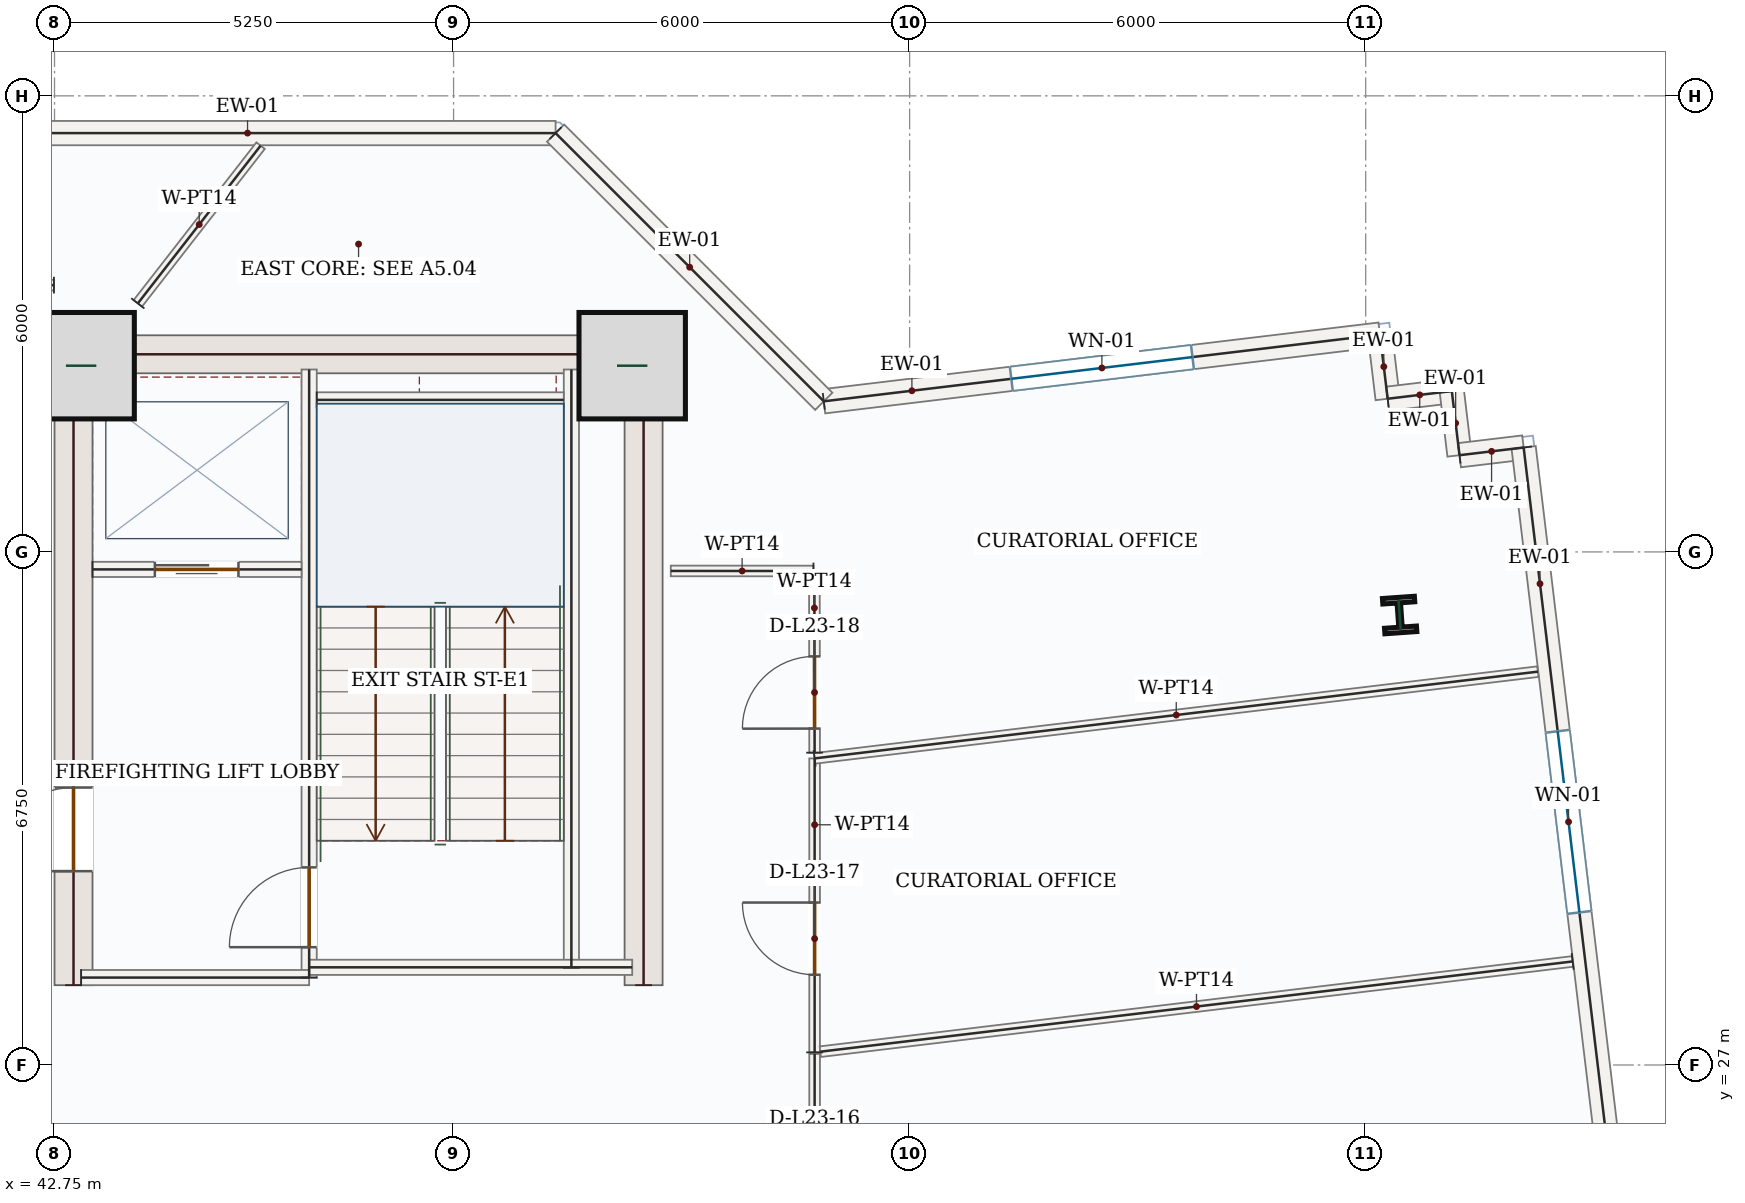
"""IFC4 building model, lengths in metres.
Left out: names, types, materials, properties, quantities, classifications, styles, units other than length and angle.
Written with IfcOpenShell. Run it as: python <this file> out.ifc"""

import sys

from ifc_helpers import new_model, si_unit, direction, frame, frame_2d, origin, origin_2d, place, context, subcontext, project, spatial, rectangle, i_section, extrude, source, transform, mapped, element, fill, save


model = new_model("IFC4")
c1 = context("Model", 3, precision=1e-05, world=origin(), true_north=direction((0.0, 1.0)))
c2 = subcontext(c1, "Body", "Model", "MODEL_VIEW")
j1 = project(units=[si_unit("LENGTHUNIT", "METRE"), si_unit("PLANEANGLEUNIT", "RADIAN")], contexts=[c1])
p1 = place(None, origin())
s1 = spatial("IfcSite", under=j1, at=p1, CompositionType="ELEMENT")
p2 = place(p1, origin())
s2 = spatial("IfcBuilding", under=s1, at=p2, CompositionType="ELEMENT")
p3 = place(p2, frame((0.0, 0.0, 104.7)))
s3 = spatial("IfcBuildingStorey", under=s2, at=p3, CompositionType="ELEMENT", Elevation=104.7)
p4 = place(p3, frame((43.0, 28.05, 0.0), z_axis=(0.0, 0.0, 1.0), x_axis=(0.0, 1.0, 0.0)))
e1 = element("IfcWall", 1, at=p4, inside=s3, PredefinedType="SHEAR", context=c2, shape_type="SweptSolid", body=[
    extrude(rectangle(XDim=8.55, YDim=0.5, at=frame_2d((4.275, 0.0))), origin(), (0.0, 0.0, 1.0), 3.95),
])
p5 = place(p4, frame((1.5, 0.0, 0.0)))
e2 = element("IfcOpeningElement", 2, at=p5, cuts=e1, PredefinedType="OPENING", context=c2, shape_type="SweptSolid", body=[
    extrude(rectangle(XDim=1.1, YDim=2.2, at=frame_2d((0.55, 1.1))), frame((0.0, 0.26, 0.0), z_axis=(0.0, -1.0, 0.0), x_axis=(1.0, 0.0, 0.0)), (0.0, 0.0, 1.0), 0.52),
])
m1 = source(origin(), c2, "Body", "SweptSolid", [
    extrude(rectangle(XDim=8.55, YDim=0.5, at=frame_2d((4.275, 0.0))), origin(), (0.0, 0.0, 1.0), 3.95),
])
p6 = place(p3, frame((50.5, 28.05, 0.0), z_axis=(0.0, 0.0, 1.0), x_axis=(0.0, 1.0, 0.0)))
e3 = element("IfcWall", 3, at=p6, inside=s3, PredefinedType="SHEAR", context=c2, shape_type="MappedRepresentation", body=[
    mapped(m1, transform((0.0, 0.0, 0.0), x_axis=(1.0, 0.0, 0.0), y_axis=(0.0, 1.0, 0.0), z_axis=(0.0, 0.0, 1.0), scale=1.0)),
])
m2 = source(origin(), c2, "Body", "SweptSolid", [
    extrude(rectangle(XDim=7.0, YDim=0.5, at=frame_2d((3.5, 0.0))), origin(), (0.0, 0.0, 1.0), 3.95),
])
p7 = place(p3, frame((43.25, 36.35, 0.0), z_axis=(0.0, 0.0, 1.0), x_axis=(1.0, 0.0, 0.0)))
e4 = element("IfcWall", 4, at=p7, inside=s3, PredefinedType="SHEAR", context=c2, shape_type="MappedRepresentation", body=[
    mapped(m2, transform((0.0, 0.0, 0.0), x_axis=(1.0, 0.0, 0.0), y_axis=(0.0, 1.0, 0.0), z_axis=(0.0, 0.0, 1.0), scale=1.0)),
])
m3 = source(origin(), c2, "Body", "SweptSolid", [
    extrude(rectangle(XDim=1.4, YDim=1.4, at=origin_2d()), origin(), (0.0, 0.0, 1.0), 4.2),
])
for number, where, z_axis, x_axis in (
    (5, (43.1, 36.2, 0.0), (0.0, 0.0, 1.0), (1.0, 0.0, 0.0)),
    (6, (50.35, 36.2, 0.0), (0.0, 0.0, 1.0), (1.0, 0.0, 0.0)),
):
    element("IfcColumn", number, at=place(p3, frame(where, z_axis=z_axis, x_axis=x_axis)), inside=s3, PredefinedType="COLUMN", context=c2, shape_type="MappedRepresentation", body=[
        mapped(m3, transform((0.0, 0.0, 0.0), x_axis=(1.0, 0.0, 0.0), y_axis=(0.0, 1.0, 0.0), z_axis=(0.0, 0.0, 1.0), scale=1.0)),
    ])
m4 = source(origin(), c2, "Body", "SweptSolid", [
    extrude(i_section(OverallWidth=0.421, OverallDepth=0.465, WebThickness=0.045, FlangeThickness=0.073, FilletRadius=0.018, at=origin_2d()), origin(), (0.0, 0.0, 1.0), 4.2),
])
p8 = place(p3, frame((60.447, 32.92, 0.0), z_axis=(0.0, 0.0, 1.0), x_axis=(0.99756405026, 0.069756473744, 0.0)))
e7 = element("IfcColumn", 7, at=p8, inside=s3, PredefinedType="COLUMN", context=c2, shape_type="MappedRepresentation", body=[
    mapped(m4, transform((0.0, 0.0, 0.0), x_axis=(1.0, 0.0, 0.0), y_axis=(0.0, 1.0, 0.0), z_axis=(0.0, 0.0, 1.0), scale=1.0)),
])
p9 = place(p3, frame((52.871, 35.731, 0.0), z_axis=(0.0, 0.0, 1.0), x_axis=(0.992882794037, 0.119095580547, 0.0)))
e8 = element("IfcWall", 8, at=p9, inside=s3, PredefinedType="SOLIDWALL", context=c2, shape_type="SweptSolid", body=[
    extrude(rectangle(XDim=7.37, YDim=0.32, at=frame_2d((3.685, 0.0))), origin(), (0.0, 0.0, 1.0), 3.95),
])
p10 = place(p9, frame((2.485, 0.0, 0.85)))
e9 = element("IfcOpeningElement", 9, at=p10, cuts=e8, PredefinedType="OPENING", context=c2, shape_type="SweptSolid", body=[
    extrude(rectangle(XDim=2.4, YDim=1.8, at=frame_2d((1.2, 0.9))), frame((0.0, 0.17, 0.0), z_axis=(0.0, -1.0, 0.0), x_axis=(1.0, 0.0, 0.0)), (0.0, 0.0, 1.0), 0.34),
])
m5 = source(origin(), c2, "Body", "SweptSolid", [
    extrude(rectangle(XDim=0.85, YDim=0.32, at=frame_2d((0.425, 0.0))), origin(), (0.0, 0.0, 1.0), 3.95),
])
for number, where, z_axis, x_axis in (
    (10, (60.188, 36.609, 0.0), (0.0, 0.0, 1.0), (0.119, -0.993, 0.0)),
    (11, (60.289, 35.765, 0.0), (0.0, 0.0, 1.0), (0.993, 0.119, 0.0)),
):
    element("IfcWall", number, at=place(p3, frame(where, z_axis=z_axis, x_axis=x_axis)), inside=s3, PredefinedType="SOLIDWALL", context=c2, shape_type="MappedRepresentation", body=[
        mapped(m5, transform((0.0, 0.0, 0.0), x_axis=(1.0, 0.0, 0.0), y_axis=(0.0, 1.0, 0.0), z_axis=(0.0, 0.0, 1.0), scale=1.0)),
    ])
m6 = source(origin(), c2, "Body", "SweptSolid", [
    extrude(rectangle(XDim=0.85, YDim=0.32, at=frame_2d((0.425, 0.0))), origin(), (0.0, 0.0, 1.0), 3.95),
])
p11 = place(p3, frame((61.133, 35.866, 0.0), z_axis=(0.0, 0.0, 1.0), x_axis=(0.11894130009, -0.992901287708, 0.0)))
e12 = element("IfcWall", 12, at=p11, inside=s3, PredefinedType="SOLIDWALL", context=c2, shape_type="MappedRepresentation", body=[
    mapped(m6, transform((0.0, 0.0, 0.0), x_axis=(1.0, 0.0, 0.0), y_axis=(0.0, 1.0, 0.0), z_axis=(0.0, 0.0, 1.0), scale=1.0)),
])
p12 = place(p3, frame((61.234, 35.022, 0.0), z_axis=(0.0, 0.0, 1.0), x_axis=(0.992905350382, 0.118907380694, 0.0)))
e13 = element("IfcWall", 13, at=p12, inside=s3, PredefinedType="SOLIDWALL", context=c2, shape_type="MappedRepresentation", body=[
    mapped(m5, transform((0.0, 0.0, 0.0), x_axis=(1.0, 0.0, 0.0), y_axis=(0.0, 1.0, 0.0), z_axis=(0.0, 0.0, 1.0), scale=1.0)),
])
p13 = place(p3, frame((62.078, 35.124, 0.0), z_axis=(0.0, 0.0, 1.0), x_axis=(0.119092815244, -0.992883125729, 0.0)))
e14 = element("IfcWall", 14, at=p13, inside=s3, PredefinedType="SOLIDWALL", context=c2, shape_type="SweptSolid", body=[
    extrude(rectangle(XDim=9.92, YDim=0.32, at=frame_2d((4.96, 0.0))), origin(), (0.0, 0.0, 1.0), 3.95),
])
p14 = place(p13, frame((3.76, 0.0, 0.85)))
e15 = element("IfcOpeningElement", 15, at=p14, cuts=e14, PredefinedType="OPENING", context=c2, shape_type="SweptSolid", body=[
    extrude(rectangle(XDim=2.4, YDim=1.8, at=frame_2d((1.2, 0.9))), frame((0.0, 0.17, 0.0), z_axis=(0.0, -1.0, 0.0), x_axis=(1.0, 0.0, 0.0)), (0.0, 0.0, 1.0), 0.34),
])
m7 = source(origin(), c2, "Body", "SweptSolid", [
    extrude(rectangle(XDim=8.105, YDim=0.32, at=frame_2d((4.052, 0.0))), origin(), (0.0, 0.0, 1.0), 3.95),
])
p15 = place(p3, frame((41.237, 39.26, 0.0), z_axis=(0.0, 0.0, 1.0), x_axis=(1.0, 0.0, 0.0)))
e16 = element("IfcWall", 16, at=p15, inside=s3, PredefinedType="SOLIDWALL", context=c2, shape_type="MappedRepresentation", body=[
    mapped(m7, transform((0.0, 0.0, 0.0), x_axis=(1.0, 0.0, 0.0), y_axis=(0.0, 1.0, 0.0), z_axis=(0.0, 0.0, 1.0), scale=1.0)),
])
m8 = source(origin(), c2, "Body", "SweptSolid", [
    extrude(rectangle(XDim=4.99, YDim=0.32, at=frame_2d((2.495, 0.0))), origin(), (0.0, 0.0, 1.0), 3.95),
])
p16 = place(p3, frame((49.342, 39.26, 0.0), z_axis=(0.0, 0.0, 1.0), x_axis=(0.707106781187, -0.707106781187, 0.0)))
e17 = element("IfcWall", 17, at=p16, inside=s3, PredefinedType="SOLIDWALL", context=c2, shape_type="MappedRepresentation", body=[
    mapped(m8, transform((0.0, 0.0, 0.0), x_axis=(1.0, 0.0, 0.0), y_axis=(0.0, 1.0, 0.0), z_axis=(0.0, 0.0, 1.0), scale=1.0)),
])
m9 = source(origin(), c2, "Body", "SweptSolid", [
    extrude(rectangle(XDim=7.87, YDim=0.2, at=frame_2d((3.935, 0.0))), origin(), (0.0, 0.0, 1.0), 3.95),
])
p17 = place(p3, frame((49.55, 28.28, 0.0), z_axis=(0.0, 0.0, 1.0), x_axis=(0.0, 1.0, 0.0)))
e18 = element("IfcWall", 18, at=p17, inside=s3, PredefinedType="SOLIDWALL", context=c2, shape_type="MappedRepresentation", body=[
    mapped(m9, transform((0.0, 0.0, 0.0), x_axis=(1.0, 0.0, 0.0), y_axis=(0.0, 1.0, 0.0), z_axis=(0.0, 0.0, 1.0), scale=1.0)),
])
p18 = place(p3, frame((46.1, 28.15, 0.0), z_axis=(0.0, 0.0, 1.0), x_axis=(0.0, 1.0, 0.0)))
e19 = element("IfcWall", 19, at=p18, inside=s3, PredefinedType="SOLIDWALL", context=c2, shape_type="SweptSolid", body=[
    extrude(rectangle(XDim=8.0, YDim=0.2, at=frame_2d((4.0, 0.0))), origin(), (0.0, 0.0, 1.0), 3.95),
])
p19 = place(p18, frame((0.4, 0.0, 0.0)))
e20 = element("IfcOpeningElement", 20, at=p19, cuts=e19, PredefinedType="OPENING", context=c2, shape_type="SweptSolid", body=[
    extrude(rectangle(XDim=1.05, YDim=2.15, at=frame_2d((0.525, 1.075))), frame((0.0, 0.11, 0.0), z_axis=(0.0, -1.0, 0.0), x_axis=(1.0, 0.0, 0.0)), (0.0, 0.0, 1.0), 0.22),
])
m10 = source(origin(), c2, "Body", "SweptSolid", [
    extrude(rectangle(XDim=3.0, YDim=0.2, at=frame_2d((1.5, 0.0))), origin(), (0.0, 0.0, 1.0), 3.95),
])
p20 = place(p3, frame((43.1, 28.15, 0.0), z_axis=(0.0, 0.0, 1.0), x_axis=(1.0, 0.0, 0.0)))
e21 = element("IfcWall", 21, at=p20, inside=s3, PredefinedType="SOLIDWALL", context=c2, shape_type="MappedRepresentation", body=[
    mapped(m10, transform((0.0, 0.0, 0.0), x_axis=(1.0, 0.0, 0.0), y_axis=(0.0, 1.0, 0.0), z_axis=(0.0, 0.0, 1.0), scale=1.0)),
])
m11 = source(origin(), c2, "Body", "SweptSolid", [
    extrude(rectangle(XDim=4.25, YDim=0.2, at=frame_2d((2.125, 0.0))), origin(), (0.0, 0.0, 1.0), 3.95),
])
p21 = place(p3, frame((46.1, 28.285, 0.0), z_axis=(0.0, 0.0, 1.0), x_axis=(1.0, 0.0, 0.0)))
e22 = element("IfcWall", 22, at=p21, inside=s3, PredefinedType="SOLIDWALL", context=c2, shape_type="MappedRepresentation", body=[
    mapped(m11, transform((0.0, 0.0, 0.0), x_axis=(1.0, 0.0, 0.0), y_axis=(0.0, 1.0, 0.0), z_axis=(0.0, 0.0, 1.0), scale=1.0)),
])
m12 = source(origin(), c2, "Body", "SweptSolid", [
    extrude(rectangle(XDim=3.25, YDim=0.2, at=frame_2d((1.625, 0.0))), origin(), (0.0, 0.0, 1.0), 3.95),
])
p22 = place(p3, frame((46.2, 35.75, 0.0), z_axis=(0.0, 0.0, 1.0), x_axis=(1.0, 0.0, 0.0)))
e23 = element("IfcWall", 23, at=p22, inside=s3, PredefinedType="SOLIDWALL", context=c2, shape_type="MappedRepresentation", body=[
    mapped(m12, transform((0.0, 0.0, 0.0), x_axis=(1.0, 0.0, 0.0), y_axis=(0.0, 1.0, 0.0), z_axis=(0.0, 0.0, 1.0), scale=1.0)),
])
p23 = place(p3, frame((43.25, 33.52, 0.0), z_axis=(0.0, 0.0, 1.0), x_axis=(1.0, 0.0, 0.0)))
e24 = element("IfcWall", 24, at=p23, inside=s3, PredefinedType="SOLIDWALL", context=c2, shape_type="SweptSolid", body=[
    extrude(rectangle(XDim=2.75, YDim=0.2, at=frame_2d((1.375, 0.0))), origin(), (0.0, 0.0, 1.0), 3.95),
])
p24 = place(p23, frame((0.82, 0.0, 0.0)))
e25 = element("IfcOpeningElement", 25, at=p24, cuts=e24, PredefinedType="OPENING", context=c2, shape_type="SweptSolid", body=[
    extrude(rectangle(XDim=1.1, YDim=2.15, at=frame_2d((0.55, 1.075))), frame((0.0, 0.11, 0.0), z_axis=(0.0, -1.0, 0.0), x_axis=(1.0, 0.0, 0.0)), (0.0, 0.0, 1.0), 0.22),
])
p25 = place(p3, frame((52.75, 27.166, 0.0), z_axis=(0.0, 0.0, 1.0), x_axis=(0.0, 1.0, 0.0)))
e26 = element("IfcWall", 26, at=p25, inside=s3, PredefinedType="PARTITIONING", context=c2, shape_type="SweptSolid", body=[
    extrude(rectangle(XDim=3.868, YDim=0.14, at=frame_2d((1.934, 0.0))), origin(), (0.0, 0.0, 1.0), 3.95),
])
p26 = place(p25, frame((1.021, 0.0, 0.0)))
e27 = element("IfcOpeningElement", 27, at=p26, cuts=e26, PredefinedType="OPENING", context=c2, shape_type="SweptSolid", body=[
    extrude(rectangle(XDim=0.95, YDim=2.15, at=frame_2d((0.475, 1.075))), frame((0.0, 0.08, 0.0), z_axis=(0.0, -1.0, 0.0), x_axis=(1.0, 0.0, 0.0)), (0.0, 0.0, 1.0), 0.16),
])
m13 = source(origin(), c2, "Body", "SweptSolid", [
    extrude(rectangle(XDim=9.584, YDim=0.14, at=frame_2d((4.792, 0.0))), origin(), (0.0, 0.0, 1.0), 3.95),
])
p27 = place(p3, frame((52.75, 31.034, 0.0), z_axis=(0.0, 0.0, 1.0), x_axis=(0.992883225705, 0.119091981737, 0.0)))
e28 = element("IfcWall", 28, at=p27, inside=s3, PredefinedType="PARTITIONING", context=c2, shape_type="MappedRepresentation", body=[
    mapped(m13, transform((0.0, 0.0, 0.0), x_axis=(1.0, 0.0, 0.0), y_axis=(0.0, 1.0, 0.0), z_axis=(0.0, 0.0, 1.0), scale=1.0)),
])
m14 = source(origin(), c2, "Body", "SweptSolid", [
    extrude(rectangle(XDim=9.969, YDim=0.14, at=frame_2d((4.984, 0.0))), origin(), (0.0, 0.0, 1.0), 3.95),
])
p28 = place(p3, frame((62.723, 28.362, 0.0), z_axis=(0.0, 0.0, 1.0), x_axis=(-0.992882747367, -0.119095969623, 0.0)))
e29 = element("IfcWall", 29, at=p28, inside=s3, PredefinedType="PARTITIONING", context=c2, shape_type="MappedRepresentation", body=[
    mapped(m14, transform((0.0, 0.0, 0.0), x_axis=(1.0, 0.0, 0.0), y_axis=(0.0, 1.0, 0.0), z_axis=(0.0, 0.0, 1.0), scale=1.0)),
])
p29 = place(p3, frame((52.75, 20.575, 0.0), z_axis=(0.0, 0.0, 1.0), x_axis=(0.0, 1.0, 0.0)))
e30 = element("IfcWall", 30, at=p29, inside=s3, PredefinedType="PARTITIONING", context=c2, shape_type="SweptSolid", body=[
    extrude(rectangle(XDim=6.571, YDim=0.14, at=frame_2d((3.285, 0.0))), origin(), (0.0, 0.0, 1.0), 3.95),
])
p30 = place(p29, frame((4.384, 0.0, 0.0)))
e31 = element("IfcOpeningElement", 31, at=p30, cuts=e30, PredefinedType="OPENING", context=c2, shape_type="SweptSolid", body=[
    extrude(rectangle(XDim=0.95, YDim=2.15, at=frame_2d((0.475, 1.075))), frame((0.0, 0.08, 0.0), z_axis=(0.0, -1.0, 0.0), x_axis=(1.0, 0.0, 0.0)), (0.0, 0.0, 1.0), 0.16),
])
m15 = source(origin(), c2, "Body", "SweptSolid", [
    extrude(rectangle(XDim=2.629, YDim=0.14, at=frame_2d((1.315, 0.0))), origin(), (0.0, 0.0, 1.0), 3.95),
])
p31 = place(p3, frame((43.846, 37.02, 0.0), z_axis=(0.0, 0.0, 1.0), x_axis=(0.614210560268, 0.789142184689, 0.0)))
e32 = element("IfcWall", 32, at=p31, inside=s3, PredefinedType="PARTITIONING", context=c2, shape_type="MappedRepresentation", body=[
    mapped(m15, transform((0.0, 0.0, 0.0), x_axis=(1.0, 0.0, 0.0), y_axis=(0.0, 1.0, 0.0), z_axis=(0.0, 0.0, 1.0), scale=1.0)),
])
p32 = place(p3, frame((52.75, 31.109, 0.0), z_axis=(0.0, 0.0, 1.0), x_axis=(-0.001430175266, 0.999998977299, 0.0)))
e33 = element("IfcWall", 33, at=p32, inside=s3, PredefinedType="PARTITIONING", context=c2, shape_type="SweptSolid", body=[
    extrude(rectangle(XDim=2.39, YDim=0.14, at=frame_2d((1.195, 0.0))), origin(), (0.0, 0.0, 1.0), 3.95),
])
p33 = place(p32, frame((0.317, 0.0, 0.0)))
e34 = element("IfcOpeningElement", 34, at=p33, cuts=e33, PredefinedType="OPENING", context=c2, shape_type="SweptSolid", body=[
    extrude(rectangle(XDim=0.95, YDim=2.15, at=frame_2d((0.475, 1.075))), frame((0.0, 0.08, 0.0), z_axis=(0.0, -1.0, 0.0), x_axis=(1.0, 0.0, 0.0)), (0.0, 0.0, 1.0), 0.16),
])
m16 = source(origin(), c2, "Body", "SweptSolid", [
    extrude(rectangle(XDim=1.877, YDim=0.14, at=frame_2d((0.938, 0.0))), origin(), (0.0, 0.0, 1.0), 3.95),
])
p34 = place(p3, frame((52.735, 33.499, 0.0), z_axis=(0.0, 0.0, 1.0), x_axis=(-0.999999923865, 0.000390218493, 0.0)))
e35 = element("IfcWall", 35, at=p34, inside=s3, PredefinedType="PARTITIONING", context=c2, shape_type="MappedRepresentation", body=[
    mapped(m16, transform((0.0, 0.0, 0.0), x_axis=(1.0, 0.0, 0.0), y_axis=(0.0, 1.0, 0.0), z_axis=(0.0, 0.0, 1.0), scale=1.0)),
])
p35 = place(p3, frame((42.742, 37.26, 0.0), z_axis=(0.0, 0.0, 1.0), x_axis=(-0.999999999614, 2.7778549e-05, 0.0)))
e36 = element("IfcWall", 36, at=p35, inside=s3, PredefinedType="PARTITIONING", context=c2, shape_type="SweptSolid", body=[
    extrude(rectangle(XDim=8.789, YDim=0.14, at=frame_2d((4.395, 0.0))), origin(), (0.0, 0.0, 1.0), 3.95),
])
p36 = place(p35, frame((6.114, 0.0, 0.0)))
e37 = element("IfcOpeningElement", 37, at=p36, cuts=e36, PredefinedType="OPENING", context=c2, shape_type="SweptSolid", body=[
    extrude(rectangle(XDim=0.95, YDim=2.15, at=frame_2d((0.475, 1.075))), frame((0.0, 0.08, 0.0), z_axis=(0.0, -1.0, 0.0), x_axis=(1.0, 0.0, 0.0)), (0.0, 0.0, 1.0), 0.16),
])
m17 = source(origin(), c2, "Body", "SweptSolid", [
    extrude(rectangle(XDim=2.4, YDim=1.8, at=frame_2d((1.2, 0.9))), frame((0.0, 0.03, 0.0), z_axis=(0.0, -1.0, 0.0), x_axis=(1.0, 0.0, 0.0)), (0.0, 0.0, 1.0), 0.06),
])
p37 = place(p10, origin())
e38 = element("IfcWindow", 38, at=p37, inside=s3, PartitioningType="DOUBLE_PANEL_VERTICAL", PredefinedType="WINDOW", context=c2, shape_type="MappedRepresentation", body=[
    mapped(m17, transform((0.0, 0.0, 0.0), x_axis=(1.0, 0.0, 0.0), y_axis=(0.0, 1.0, 0.0), z_axis=(0.0, 0.0, 1.0), scale=1.0)),
])
fill(e9, e38)
p38 = place(p14, origin())
e39 = element("IfcWindow", 39, at=p38, inside=s3, PartitioningType="DOUBLE_PANEL_VERTICAL", PredefinedType="WINDOW", context=c2, shape_type="MappedRepresentation", body=[
    mapped(m17, transform((0.0, 0.0, 0.0), x_axis=(1.0, 0.0, 0.0), y_axis=(0.0, 1.0, 0.0), z_axis=(0.0, 0.0, 1.0), scale=1.0)),
])
fill(e15, e39)
m18 = source(origin(), c2, "Body", "SweptSolid", [
    extrude(rectangle(XDim=1.05, YDim=2.15, at=frame_2d((0.525, 1.075))), frame((0.0, 0.025, 0.0), z_axis=(0.0, -1.0, 0.0), x_axis=(1.0, 0.0, 0.0)), (0.0, 0.0, 1.0), 0.05),
])
p39 = place(p19, origin())
e40 = element("IfcDoor", 40, at=p39, inside=s3, OperationType="SINGLE_SWING_LEFT", PredefinedType="DOOR", context=c2, shape_type="MappedRepresentation", body=[
    mapped(m18, transform((0.0, 0.0, 0.0), x_axis=(1.0, 0.0, 0.0), y_axis=(0.0, 1.0, 0.0), z_axis=(0.0, 0.0, 1.0), scale=1.0)),
])
fill(e20, e40)
m19 = source(origin(), c2, "Body", "SweptSolid", [
    extrude(rectangle(XDim=1.1, YDim=2.15, at=frame_2d((0.55, 1.075))), frame((0.0, 0.025, 0.0), z_axis=(0.0, -1.0, 0.0), x_axis=(1.0, 0.0, 0.0)), (0.0, 0.0, 1.0), 0.05),
])
p40 = place(p24, origin())
e41 = element("IfcDoor", 41, at=p40, inside=s3, OperationType="DOUBLE_DOOR_SLIDING", PredefinedType="DOOR", context=c2, shape_type="MappedRepresentation", body=[
    mapped(m19, transform((0.0, 0.0, 0.0), x_axis=(1.0, 0.0, 0.0), y_axis=(0.0, 1.0, 0.0), z_axis=(0.0, 0.0, 1.0), scale=1.0)),
])
fill(e25, e41)
m20 = source(origin(), c2, "Body", "SweptSolid", [
    extrude(rectangle(XDim=1.1, YDim=2.2, at=frame_2d((0.55, 1.1))), frame((0.0, 0.025, 0.0), z_axis=(0.0, -1.0, 0.0), x_axis=(1.0, 0.0, 0.0)), (0.0, 0.0, 1.0), 0.05),
])
p41 = place(p5, origin())
e42 = element("IfcDoor", 42, at=p41, inside=s3, OperationType="SINGLE_SWING_LEFT", PredefinedType="DOOR", context=c2, shape_type="MappedRepresentation", body=[
    mapped(m20, transform((0.0, 0.0, 0.0), x_axis=(1.0, 0.0, 0.0), y_axis=(0.0, 1.0, 0.0), z_axis=(0.0, 0.0, 1.0), scale=1.0)),
])
fill(e2, e42)
m21 = source(origin(), c2, "Body", "SweptSolid", [
    extrude(rectangle(XDim=0.95, YDim=2.15, at=frame_2d((0.475, 1.075))), frame((0.0, 0.025, 0.0), z_axis=(0.0, -1.0, 0.0), x_axis=(1.0, 0.0, 0.0)), (0.0, 0.0, 1.0), 0.05),
])
p42 = place(p26, origin())
e43 = element("IfcDoor", 43, at=p42, inside=s3, OperationType="SINGLE_SWING_RIGHT", PredefinedType="DOOR", context=c2, shape_type="MappedRepresentation", body=[
    mapped(m21, transform((0.0, 0.0, 0.0), x_axis=(1.0, 0.0, 0.0), y_axis=(0.0, 1.0, 0.0), z_axis=(0.0, 0.0, 1.0), scale=1.0)),
])
fill(e27, e43)
p43 = place(p33, origin())
e44 = element("IfcDoor", 44, at=p43, inside=s3, OperationType="SINGLE_SWING_LEFT", PredefinedType="DOOR", context=c2, shape_type="MappedRepresentation", body=[
    mapped(m21, transform((0.0, 0.0, 0.0), x_axis=(1.0, 0.0, 0.0), y_axis=(0.0, 1.0, 0.0), z_axis=(0.0, 0.0, 1.0), scale=1.0)),
])
fill(e34, e44)
save(model, sys.argv[1])
